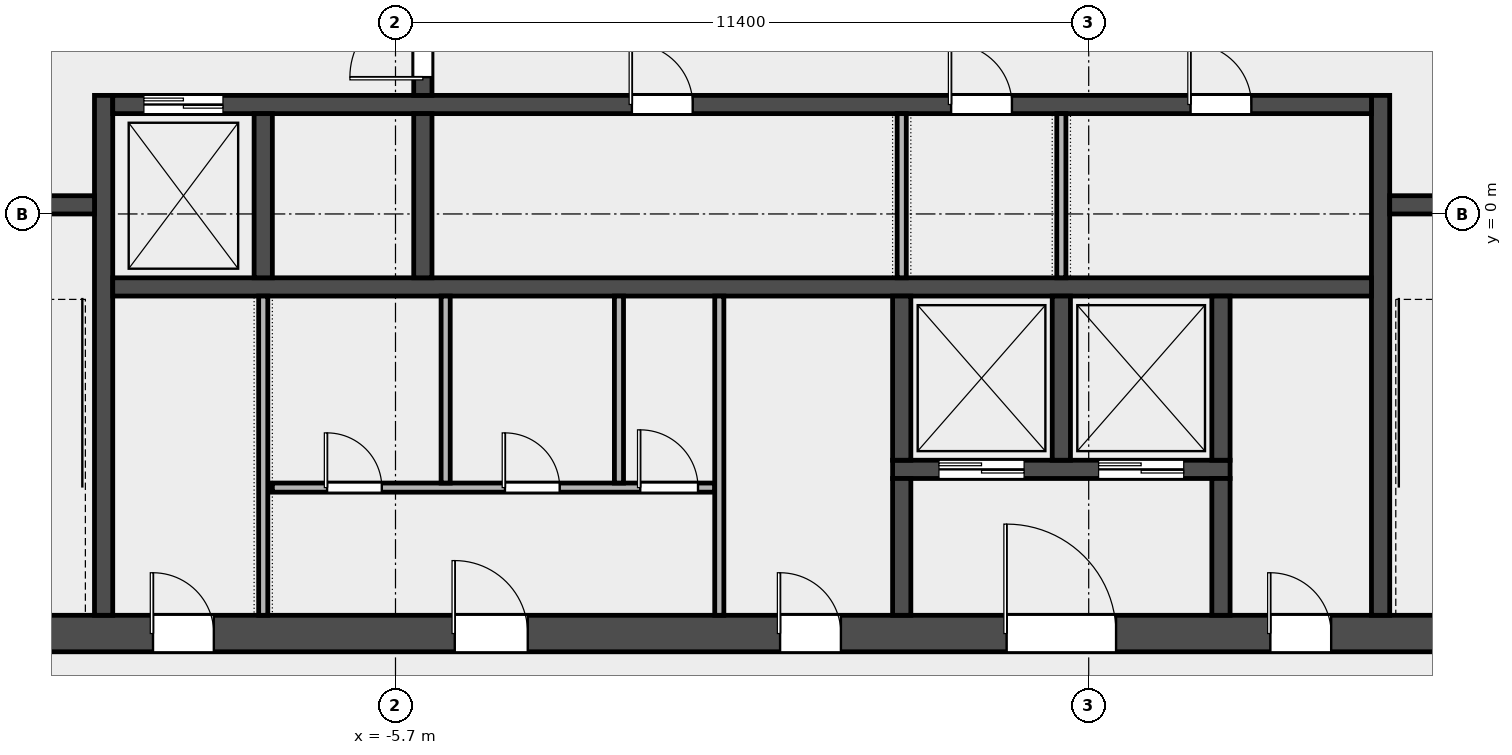
"""IFC4 building model, lengths in metres.
Left out: names, types, materials, properties, quantities, classifications, styles, units other than length and angle.
Written with IfcOpenShell. Run it as: python <this file> out.ifc"""

import sys

from ifc_helpers import new_model, si_unit, direction, frame, frame_2d, origin, place, context, subcontext, project, spatial, rectangle, extrude, element, fill, save


model = new_model("IFC4")
c1 = context("Model", 3, precision=1e-05, world=origin(), true_north=direction((0.0, 1.0)))
c2 = subcontext(c1, "Body", "Model", "MODEL_VIEW")
j1 = project(units=[si_unit("LENGTHUNIT", "METRE"), si_unit("PLANEANGLEUNIT", "RADIAN")], contexts=[c1])
p1 = place(None, origin())
s1 = spatial("IfcSite", under=j1, at=p1, CompositionType="ELEMENT")
p2 = place(p1, origin())
s2 = spatial("IfcBuilding", under=s1, at=p2, CompositionType="ELEMENT")
p3 = place(p2, frame((0.0, 0.0, 291.4)))
s3 = spatial("IfcBuildingStorey", under=s2, at=p3, CompositionType="ELEMENT", Elevation=291.4)
p4 = place(p3, frame((-14.4, -6.9, 0.0), z_axis=(0.0, 0.0, 1.0), x_axis=(1.0, 0.0, 0.0)))
e1 = element("IfcWall", 1, at=p4, inside=s3, PredefinedType="SHEAR", context=c2, shape_type="SweptSolid", body=[
    extrude(rectangle(XDim=28.8, YDim=0.6, at=frame_2d((14.4, 0.0))), origin(), (0.0, 0.0, 1.0), 3.7),
])
p5 = place(p4, frame((4.712, 0.0, 0.0)))
e2 = element("IfcOpeningElement", 2, at=p5, cuts=e1, PredefinedType="OPENING", context=c2, shape_type="SweptSolid", body=[
    extrude(rectangle(XDim=1.0, YDim=2.1, at=frame_2d((0.5, 1.05))), frame((0.0, 0.312, 0.0), z_axis=(0.0, -1.0, 0.0), x_axis=(1.0, 0.0, 0.0)), (0.0, 0.0, 1.0), 0.624),
])
p6 = place(p4, frame((9.675, 0.0, 0.0)))
e3 = element("IfcOpeningElement", 3, at=p6, cuts=e1, PredefinedType="OPENING", context=c2, shape_type="SweptSolid", body=[
    extrude(rectangle(XDim=1.2, YDim=2.1, at=frame_2d((0.6, 1.05))), frame((0.0, 0.312, 0.0), z_axis=(0.0, -1.0, 0.0), x_axis=(1.0, 0.0, 0.0)), (0.0, 0.0, 1.0), 0.624),
])
p7 = place(p4, frame((15.025, 0.0, 0.0)))
e4 = element("IfcOpeningElement", 4, at=p7, cuts=e1, PredefinedType="OPENING", context=c2, shape_type="SweptSolid", body=[
    extrude(rectangle(XDim=1.0, YDim=2.1, at=frame_2d((0.5, 1.05))), frame((0.0, 0.312, 0.0), z_axis=(0.0, -1.0, 0.0), x_axis=(1.0, 0.0, 0.0)), (0.0, 0.0, 1.0), 0.624),
])
p8 = place(p4, frame((18.75, 0.0, 0.0)))
e5 = element("IfcOpeningElement", 5, at=p8, cuts=e1, PredefinedType="OPENING", context=c2, shape_type="SweptSolid", body=[
    extrude(rectangle(XDim=1.8, YDim=2.1, at=frame_2d((0.9, 1.05))), frame((0.0, 0.312, 0.0), z_axis=(0.0, -1.0, 0.0), x_axis=(1.0, 0.0, 0.0)), (0.0, 0.0, 1.0), 0.624),
])
p9 = place(p4, frame((23.087, 0.0, 0.0)))
e6 = element("IfcOpeningElement", 6, at=p9, cuts=e1, PredefinedType="OPENING", context=c2, shape_type="SweptSolid", body=[
    extrude(rectangle(XDim=1.0, YDim=2.1, at=frame_2d((0.5, 1.05))), frame((0.0, 0.312, 0.0), z_axis=(0.0, -1.0, 0.0), x_axis=(1.0, 0.0, 0.0)), (0.0, 0.0, 1.0), 0.624),
])
for number, where, z_axis, x_axis in (
    (7, (-10.5, -6.6, 0.0), (0.0, 0.0, 1.0), (0.0, 1.0, 0.0)),
    (8, (10.5, -6.6, 0.0), (0.0, 0.0, 1.0), (0.0, 1.0, 0.0)),
):
    element("IfcWall", number, at=place(p3, frame(where, z_axis=z_axis, x_axis=x_axis)), inside=s3, PredefinedType="SHEAR", context=c2, shape_type="SweptSolid", body=[
        extrude(rectangle(XDim=8.55, YDim=0.3, at=frame_2d((4.275, 0.0))), origin(), (0.0, 0.0, 1.0), 3.7),
    ])
p10 = place(p3, frame((-13.8, 0.15, 0.0), z_axis=(0.0, 0.0, 1.0), x_axis=(1.0, 0.0, 0.0)))
e9 = element("IfcWall", 9, at=p10, inside=s3, PredefinedType="SOLIDWALL", context=c2, shape_type="SweptSolid", body=[
    extrude(rectangle(XDim=3.15, YDim=0.3, at=frame_2d((1.575, 0.0))), origin(), (0.0, 0.0, 1.0), 3.7),
])
p11 = place(p10, frame((0.975, 0.0, 0.0)))
e10 = element("IfcOpeningElement", 10, at=p11, cuts=e9, PredefinedType="OPENING", context=c2, shape_type="SweptSolid", body=[
    extrude(rectangle(XDim=1.1, YDim=2.1, at=frame_2d((0.55, 1.05))), frame((0.0, 0.162, 0.0), z_axis=(0.0, -1.0, 0.0), x_axis=(1.0, 0.0, 0.0)), (0.0, 0.0, 1.0), 0.324),
])
p12 = place(p3, frame((10.65, 0.15, 0.0), z_axis=(0.0, 0.0, 1.0), x_axis=(1.0, 0.0, 0.0)))
e11 = element("IfcWall", 11, at=p12, inside=s3, PredefinedType="SOLIDWALL", context=c2, shape_type="SweptSolid", body=[
    extrude(rectangle(XDim=3.15, YDim=0.3, at=frame_2d((1.575, 0.0))), origin(), (0.0, 0.0, 1.0), 3.7),
])
p13 = place(p12, frame((1.025, 0.0, 0.0)))
e12 = element("IfcOpeningElement", 12, at=p13, cuts=e11, PredefinedType="OPENING", context=c2, shape_type="SweptSolid", body=[
    extrude(rectangle(XDim=1.1, YDim=2.1, at=frame_2d((0.55, 1.05))), frame((0.0, 0.162, 0.0), z_axis=(0.0, -1.0, 0.0), x_axis=(1.0, 0.0, 0.0)), (0.0, 0.0, 1.0), 0.324),
])
p14 = place(p3, frame((-10.35, -1.2, 0.0), z_axis=(0.0, 0.0, 1.0), x_axis=(1.0, 0.0, 0.0)))
e13 = element("IfcWall", 13, at=p14, inside=s3, PredefinedType="SOLIDWALL", context=c2, shape_type="SweptSolid", body=[
    extrude(rectangle(XDim=20.7, YDim=0.3, at=frame_2d((10.35, 0.0))), origin(), (0.0, 0.0, 1.0), 3.7),
])
p15 = place(p3, frame((-10.35, 1.8, 0.0), z_axis=(0.0, 0.0, 1.0), x_axis=(1.0, 0.0, 0.0)))
e14 = element("IfcWall", 14, at=p15, inside=s3, PredefinedType="SOLIDWALL", context=c2, shape_type="SweptSolid", body=[
    extrude(rectangle(XDim=20.7, YDim=0.3, at=frame_2d((10.35, 0.0))), origin(), (0.0, 0.0, 1.0), 3.7),
])
p16 = place(p15, frame((0.512, 0.0, 0.0)))
e15 = element("IfcOpeningElement", 15, at=p16, cuts=e14, PredefinedType="OPENING", context=c2, shape_type="SweptSolid", body=[
    extrude(rectangle(XDim=1.3, YDim=2.1, at=frame_2d((0.65, 1.05))), frame((0.0, 0.162, 0.0), z_axis=(0.0, -1.0, 0.0), x_axis=(1.0, 0.0, 0.0)), (0.0, 0.0, 1.0), 0.324),
])
p17 = place(p15, frame((8.538, 0.0, 0.0)))
e16 = element("IfcOpeningElement", 16, at=p17, cuts=e14, PredefinedType="OPENING", context=c2, shape_type="SweptSolid", body=[
    extrude(rectangle(XDim=1.0, YDim=2.1, at=frame_2d((0.5, 1.05))), frame((0.0, 0.162, 0.0), z_axis=(0.0, -1.0, 0.0), x_axis=(1.0, 0.0, 0.0)), (0.0, 0.0, 1.0), 0.324),
])
p18 = place(p15, frame((13.788, 0.0, 0.0)))
e17 = element("IfcOpeningElement", 17, at=p18, cuts=e14, PredefinedType="OPENING", context=c2, shape_type="SweptSolid", body=[
    extrude(rectangle(XDim=1.0, YDim=2.1, at=frame_2d((0.5, 1.05))), frame((0.0, 0.162, 0.0), z_axis=(0.0, -1.0, 0.0), x_axis=(1.0, 0.0, 0.0)), (0.0, 0.0, 1.0), 0.324),
])
p19 = place(p15, frame((17.725, 0.0, 0.0)))
e18 = element("IfcOpeningElement", 18, at=p19, cuts=e14, PredefinedType="OPENING", context=c2, shape_type="SweptSolid", body=[
    extrude(rectangle(XDim=1.0, YDim=2.1, at=frame_2d((0.5, 1.05))), frame((0.0, 0.162, 0.0), z_axis=(0.0, -1.0, 0.0), x_axis=(1.0, 0.0, 0.0)), (0.0, 0.0, 1.0), 0.324),
])
for number, where, z_axis, x_axis in (
    (19, (-7.875, -1.05, 0.0), (0.0, 0.0, 1.0), (0.0, 1.0, 0.0)),
    (20, (-5.25, -1.05, 0.0), (0.0, 0.0, 1.0), (0.0, 1.0, 0.0)),
):
    element("IfcWall", number, at=place(p3, frame(where, z_axis=z_axis, x_axis=x_axis)), inside=s3, PredefinedType="SOLIDWALL", context=c2, shape_type="SweptSolid", body=[
        extrude(rectangle(XDim=2.7, YDim=0.3, at=frame_2d((1.35, 0.0))), origin(), (0.0, 0.0, 1.0), 3.7),
    ])
p20 = place(p3, frame((-5.25, 1.95, 0.0), z_axis=(0.0, 0.0, 1.0), x_axis=(0.0, 1.0, 0.0)))
e21 = element("IfcWall", 21, at=p20, inside=s3, PredefinedType="SOLIDWALL", context=c2, shape_type="SweptSolid", body=[
    extrude(rectangle(XDim=3.3, YDim=0.3, at=frame_2d((1.65, 0.0))), origin(), (0.0, 0.0, 1.0), 3.7),
])
p21 = place(p20, frame((0.3, 0.0, 0.0)))
e22 = element("IfcOpeningElement", 22, at=p21, cuts=e21, PredefinedType="OPENING", context=c2, shape_type="SweptSolid", body=[
    extrude(rectangle(XDim=1.2, YDim=2.1, at=frame_2d((0.6, 1.05))), frame((0.0, 0.162, 0.0), z_axis=(0.0, -1.0, 0.0), x_axis=(1.0, 0.0, 0.0)), (0.0, 0.0, 1.0), 0.324),
])
p22 = place(p20, frame((1.8, 0.0, 0.0)))
e23 = element("IfcOpeningElement", 23, at=p22, cuts=e21, PredefinedType="OPENING", context=c2, shape_type="SweptSolid", body=[
    extrude(rectangle(XDim=1.2, YDim=2.1, at=frame_2d((0.6, 1.05))), frame((0.0, 0.162, 0.0), z_axis=(0.0, -1.0, 0.0), x_axis=(1.0, 0.0, 0.0)), (0.0, 0.0, 1.0), 0.324),
])
p23 = place(p3, frame((2.475, -4.2, 0.0), z_axis=(0.0, 0.0, 1.0), x_axis=(1.0, 0.0, 0.0)))
e24 = element("IfcWall", 24, at=p23, inside=s3, PredefinedType="SOLIDWALL", context=c2, shape_type="SweptSolid", body=[
    extrude(rectangle(XDim=5.55, YDim=0.3, at=frame_2d((2.775, 0.0))), origin(), (0.0, 0.0, 1.0), 3.7),
])
p24 = place(p23, frame((0.762, 0.0, 0.0)))
e25 = element("IfcOpeningElement", 25, at=p24, cuts=e24, PredefinedType="OPENING", context=c2, shape_type="SweptSolid", body=[
    extrude(rectangle(XDim=1.4, YDim=2.1, at=frame_2d((0.7, 1.05))), frame((0.0, 0.162, 0.0), z_axis=(0.0, -1.0, 0.0), x_axis=(1.0, 0.0, 0.0)), (0.0, 0.0, 1.0), 0.324),
])
p25 = place(p23, frame((3.387, 0.0, 0.0)))
e26 = element("IfcOpeningElement", 26, at=p25, cuts=e24, PredefinedType="OPENING", context=c2, shape_type="SweptSolid", body=[
    extrude(rectangle(XDim=1.4, YDim=2.1, at=frame_2d((0.7, 1.05))), frame((0.0, 0.162, 0.0), z_axis=(0.0, -1.0, 0.0), x_axis=(1.0, 0.0, 0.0)), (0.0, 0.0, 1.0), 0.324),
])
p26 = place(p3, frame((2.625, -4.05, 0.0), z_axis=(0.0, 0.0, 1.0), x_axis=(0.0, 1.0, 0.0)))
e27 = element("IfcWall", 27, at=p26, inside=s3, PredefinedType="SOLIDWALL", context=c2, shape_type="SweptSolid", body=[
    extrude(rectangle(XDim=2.7, YDim=0.3, at=frame_2d((1.35, 0.0))), origin(), (0.0, 0.0, 1.0), 3.7),
])
p27 = place(p3, frame((2.625, -6.6, 0.0), z_axis=(0.0, 0.0, 1.0), x_axis=(0.0, 1.0, 0.0)))
e28 = element("IfcWall", 28, at=p27, inside=s3, PredefinedType="SOLIDWALL", context=c2, shape_type="SweptSolid", body=[
    extrude(rectangle(XDim=2.25, YDim=0.3, at=frame_2d((1.125, 0.0))), origin(), (0.0, 0.0, 1.0), 3.7),
])
for number, where, z_axis, x_axis in (
    (29, (5.25, -4.05, 0.0), (0.0, 0.0, 1.0), (0.0, 1.0, 0.0)),
    (30, (7.875, -4.05, 0.0), (0.0, 0.0, 1.0), (0.0, 1.0, 0.0)),
):
    element("IfcWall", number, at=place(p3, frame(where, z_axis=z_axis, x_axis=x_axis)), inside=s3, PredefinedType="SOLIDWALL", context=c2, shape_type="SweptSolid", body=[
        extrude(rectangle(XDim=2.7, YDim=0.3, at=frame_2d((1.35, 0.0))), origin(), (0.0, 0.0, 1.0), 3.7),
    ])
p28 = place(p3, frame((7.875, -6.6, 0.0), z_axis=(0.0, 0.0, 1.0), x_axis=(0.0, 1.0, 0.0)))
e31 = element("IfcWall", 31, at=p28, inside=s3, PredefinedType="SOLIDWALL", context=c2, shape_type="SweptSolid", body=[
    extrude(rectangle(XDim=2.25, YDim=0.3, at=frame_2d((1.125, 0.0))), origin(), (0.0, 0.0, 1.0), 3.7),
])
p29 = place(p3, frame((-7.875, -6.6, 0.0), z_axis=(0.0, 0.0, 1.0), x_axis=(0.0, 1.0, 0.0)))
e32 = element("IfcWall", 32, at=p29, inside=s3, PredefinedType="PARTITIONING", context=c2, shape_type="SweptSolid", body=[
    extrude(rectangle(XDim=5.25, YDim=0.15, at=frame_2d((2.625, 0.0))), origin(), (0.0, 0.0, 1.0), 3.7),
])
p30 = place(p3, frame((-7.725, -4.5, 0.0), z_axis=(0.0, 0.0, 1.0), x_axis=(1.0, 0.0, 0.0)))
e33 = element("IfcWall", 33, at=p30, inside=s3, PredefinedType="PARTITIONING", context=c2, shape_type="SweptSolid", body=[
    extrude(rectangle(XDim=7.275, YDim=0.15, at=frame_2d((3.638, 0.0))), origin(), (0.0, 0.0, 1.0), 3.7),
])
p31 = place(p30, frame((0.9, 0.0, 0.0)))
e34 = element("IfcOpeningElement", 34, at=p31, cuts=e33, PredefinedType="OPENING", context=c2, shape_type="SweptSolid", body=[
    extrude(rectangle(XDim=0.9, YDim=2.1, at=frame_2d((0.45, 1.05))), frame((0.0, 0.087, 0.0), z_axis=(0.0, -1.0, 0.0), x_axis=(1.0, 0.0, 0.0)), (0.0, 0.0, 1.0), 0.174),
])
p32 = place(p30, frame((3.825, 0.0, 0.0)))
e35 = element("IfcOpeningElement", 35, at=p32, cuts=e33, PredefinedType="OPENING", context=c2, shape_type="SweptSolid", body=[
    extrude(rectangle(XDim=0.9, YDim=2.1, at=frame_2d((0.45, 1.05))), frame((0.0, 0.087, 0.0), z_axis=(0.0, -1.0, 0.0), x_axis=(1.0, 0.0, 0.0)), (0.0, 0.0, 1.0), 0.174),
])
p33 = place(p30, frame((6.05, 0.0, 0.0)))
e36 = element("IfcOpeningElement", 36, at=p33, cuts=e33, PredefinedType="OPENING", context=c2, shape_type="SweptSolid", body=[
    extrude(rectangle(XDim=0.95, YDim=2.1, at=frame_2d((0.475, 1.05))), frame((0.0, 0.087, 0.0), z_axis=(0.0, -1.0, 0.0), x_axis=(1.0, 0.0, 0.0)), (0.0, 0.0, 1.0), 0.174),
])
for number, where, z_axis, x_axis in (
    (37, (-4.875, -4.425, 0.0), (0.0, 0.0, 1.0), (0.0, 1.0, 0.0)),
    (38, (-2.025, -4.425, 0.0), (0.0, 0.0, 1.0), (0.0, 1.0, 0.0)),
):
    element("IfcWall", number, at=place(p3, frame(where, z_axis=z_axis, x_axis=x_axis)), inside=s3, PredefinedType="PARTITIONING", context=c2, shape_type="SweptSolid", body=[
        extrude(rectangle(XDim=3.075, YDim=0.15, at=frame_2d((1.538, 0.0))), origin(), (0.0, 0.0, 1.0), 3.7),
    ])
p34 = place(p3, frame((-0.375, -6.6, 0.0), z_axis=(0.0, 0.0, 1.0), x_axis=(0.0, 1.0, 0.0)))
e39 = element("IfcWall", 39, at=p34, inside=s3, PredefinedType="PARTITIONING", context=c2, shape_type="SweptSolid", body=[
    extrude(rectangle(XDim=5.25, YDim=0.15, at=frame_2d((2.625, 0.0))), origin(), (0.0, 0.0, 1.0), 3.7),
])
for number, where, z_axis, x_axis in (
    (40, (2.625, -1.05, 0.0), (0.0, 0.0, 1.0), (0.0, 1.0, 0.0)),
    (41, (5.25, -1.05, 0.0), (0.0, 0.0, 1.0), (0.0, 1.0, 0.0)),
):
    element("IfcWall", number, at=place(p3, frame(where, z_axis=z_axis, x_axis=x_axis)), inside=s3, PredefinedType="PARTITIONING", context=c2, shape_type="SweptSolid", body=[
        extrude(rectangle(XDim=2.7, YDim=0.15, at=frame_2d((1.35, 0.0))), origin(), (0.0, 0.0, 1.0), 3.7),
    ])
p35 = place(p21, origin())
e42 = element("IfcDoor", 42, at=p35, inside=s3, OperationType="SINGLE_SWING_LEFT", PredefinedType="DOOR", context=c2, shape_type="SweptSolid", body=[
    extrude(rectangle(XDim=1.2, YDim=2.1, at=frame_2d((0.6, 1.05))), frame((0.0, 0.025, 0.0), z_axis=(0.0, -1.0, 0.0), x_axis=(1.0, 0.0, 0.0)), (0.0, 0.0, 1.0), 0.05),
])
fill(e22, e42)
p36 = place(p16, origin())
e43 = element("IfcDoor", 43, at=p36, inside=s3, OperationType="DOUBLE_DOOR_SLIDING", PredefinedType="DOOR", context=c2, shape_type="SweptSolid", body=[
    extrude(rectangle(XDim=1.3, YDim=2.1, at=frame_2d((0.65, 1.05))), frame((0.0, 0.025, 0.0), z_axis=(0.0, -1.0, 0.0), x_axis=(1.0, 0.0, 0.0)), (0.0, 0.0, 1.0), 0.05),
])
fill(e15, e43)
p37 = place(p24, origin())
e44 = element("IfcDoor", 44, at=p37, inside=s3, OperationType="DOUBLE_DOOR_SLIDING", PredefinedType="DOOR", context=c2, shape_type="SweptSolid", body=[
    extrude(rectangle(XDim=1.4, YDim=2.1, at=frame_2d((0.7, 1.05))), frame((0.0, 0.025, 0.0), z_axis=(0.0, -1.0, 0.0), x_axis=(1.0, 0.0, 0.0)), (0.0, 0.0, 1.0), 0.05),
])
fill(e25, e44)
p38 = place(p25, origin())
e45 = element("IfcDoor", 45, at=p38, inside=s3, OperationType="DOUBLE_DOOR_SLIDING", PredefinedType="DOOR", context=c2, shape_type="SweptSolid", body=[
    extrude(rectangle(XDim=1.4, YDim=2.1, at=frame_2d((0.7, 1.05))), frame((0.0, 0.025, 0.0), z_axis=(0.0, -1.0, 0.0), x_axis=(1.0, 0.0, 0.0)), (0.0, 0.0, 1.0), 0.05),
])
fill(e26, e45)
p39 = place(p5, origin())
e46 = element("IfcDoor", 46, at=p39, inside=s3, OperationType="SINGLE_SWING_LEFT", PredefinedType="DOOR", context=c2, shape_type="SweptSolid", body=[
    extrude(rectangle(XDim=1.0, YDim=2.1, at=frame_2d((0.5, 1.05))), frame((0.0, 0.025, 0.0), z_axis=(0.0, -1.0, 0.0), x_axis=(1.0, 0.0, 0.0)), (0.0, 0.0, 1.0), 0.05),
])
fill(e2, e46)
p40 = place(p6, origin())
e47 = element("IfcDoor", 47, at=p40, inside=s3, OperationType="SINGLE_SWING_LEFT", PredefinedType="DOOR", context=c2, shape_type="SweptSolid", body=[
    extrude(rectangle(XDim=1.2, YDim=2.1, at=frame_2d((0.6, 1.05))), frame((0.0, 0.025, 0.0), z_axis=(0.0, -1.0, 0.0), x_axis=(1.0, 0.0, 0.0)), (0.0, 0.0, 1.0), 0.05),
])
fill(e3, e47)
p41 = place(p31, origin())
e48 = element("IfcDoor", 48, at=p41, inside=s3, OperationType="SINGLE_SWING_LEFT", PredefinedType="DOOR", context=c2, shape_type="SweptSolid", body=[
    extrude(rectangle(XDim=0.9, YDim=2.1, at=frame_2d((0.45, 1.05))), frame((0.0, 0.025, 0.0), z_axis=(0.0, -1.0, 0.0), x_axis=(1.0, 0.0, 0.0)), (0.0, 0.0, 1.0), 0.05),
])
fill(e34, e48)
p42 = place(p32, origin())
e49 = element("IfcDoor", 49, at=p42, inside=s3, OperationType="SINGLE_SWING_LEFT", PredefinedType="DOOR", context=c2, shape_type="SweptSolid", body=[
    extrude(rectangle(XDim=0.9, YDim=2.1, at=frame_2d((0.45, 1.05))), frame((0.0, 0.025, 0.0), z_axis=(0.0, -1.0, 0.0), x_axis=(1.0, 0.0, 0.0)), (0.0, 0.0, 1.0), 0.05),
])
fill(e35, e49)
p43 = place(p33, origin())
e50 = element("IfcDoor", 50, at=p43, inside=s3, OperationType="SINGLE_SWING_LEFT", PredefinedType="DOOR", context=c2, shape_type="SweptSolid", body=[
    extrude(rectangle(XDim=0.95, YDim=2.1, at=frame_2d((0.475, 1.05))), frame((0.0, 0.025, 0.0), z_axis=(0.0, -1.0, 0.0), x_axis=(1.0, 0.0, 0.0)), (0.0, 0.0, 1.0), 0.05),
])
fill(e36, e50)
p44 = place(p7, origin())
e51 = element("IfcDoor", 51, at=p44, inside=s3, OperationType="SINGLE_SWING_LEFT", PredefinedType="DOOR", context=c2, shape_type="SweptSolid", body=[
    extrude(rectangle(XDim=1.0, YDim=2.1, at=frame_2d((0.5, 1.05))), frame((0.0, 0.025, 0.0), z_axis=(0.0, -1.0, 0.0), x_axis=(1.0, 0.0, 0.0)), (0.0, 0.0, 1.0), 0.05),
])
fill(e4, e51)
p45 = place(p8, origin())
e52 = element("IfcDoor", 52, at=p45, inside=s3, OperationType="DOUBLE_DOOR_SINGLE_SWING", PredefinedType="DOOR", context=c2, shape_type="SweptSolid", body=[
    extrude(rectangle(XDim=1.8, YDim=2.1, at=frame_2d((0.9, 1.05))), frame((0.0, 0.025, 0.0), z_axis=(0.0, -1.0, 0.0), x_axis=(1.0, 0.0, 0.0)), (0.0, 0.0, 1.0), 0.05),
])
fill(e5, e52)
p46 = place(p9, origin())
e53 = element("IfcDoor", 53, at=p46, inside=s3, OperationType="SINGLE_SWING_LEFT", PredefinedType="DOOR", context=c2, shape_type="SweptSolid", body=[
    extrude(rectangle(XDim=1.0, YDim=2.1, at=frame_2d((0.5, 1.05))), frame((0.0, 0.025, 0.0), z_axis=(0.0, -1.0, 0.0), x_axis=(1.0, 0.0, 0.0)), (0.0, 0.0, 1.0), 0.05),
])
fill(e6, e53)
p47 = place(p17, origin())
e54 = element("IfcDoor", 54, at=p47, inside=s3, OperationType="SINGLE_SWING_LEFT", PredefinedType="DOOR", context=c2, shape_type="SweptSolid", body=[
    extrude(rectangle(XDim=1.0, YDim=2.1, at=frame_2d((0.5, 1.05))), frame((0.0, 0.025, 0.0), z_axis=(0.0, -1.0, 0.0), x_axis=(1.0, 0.0, 0.0)), (0.0, 0.0, 1.0), 0.05),
])
fill(e16, e54)
p48 = place(p18, origin())
e55 = element("IfcDoor", 55, at=p48, inside=s3, OperationType="SINGLE_SWING_LEFT", PredefinedType="DOOR", context=c2, shape_type="SweptSolid", body=[
    extrude(rectangle(XDim=1.0, YDim=2.1, at=frame_2d((0.5, 1.05))), frame((0.0, 0.025, 0.0), z_axis=(0.0, -1.0, 0.0), x_axis=(1.0, 0.0, 0.0)), (0.0, 0.0, 1.0), 0.05),
])
fill(e17, e55)
p49 = place(p19, origin())
e56 = element("IfcDoor", 56, at=p49, inside=s3, OperationType="SINGLE_SWING_LEFT", PredefinedType="DOOR", context=c2, shape_type="SweptSolid", body=[
    extrude(rectangle(XDim=1.0, YDim=2.1, at=frame_2d((0.5, 1.05))), frame((0.0, 0.025, 0.0), z_axis=(0.0, -1.0, 0.0), x_axis=(1.0, 0.0, 0.0)), (0.0, 0.0, 1.0), 0.05),
])
fill(e18, e56)
save(model, sys.argv[1])
